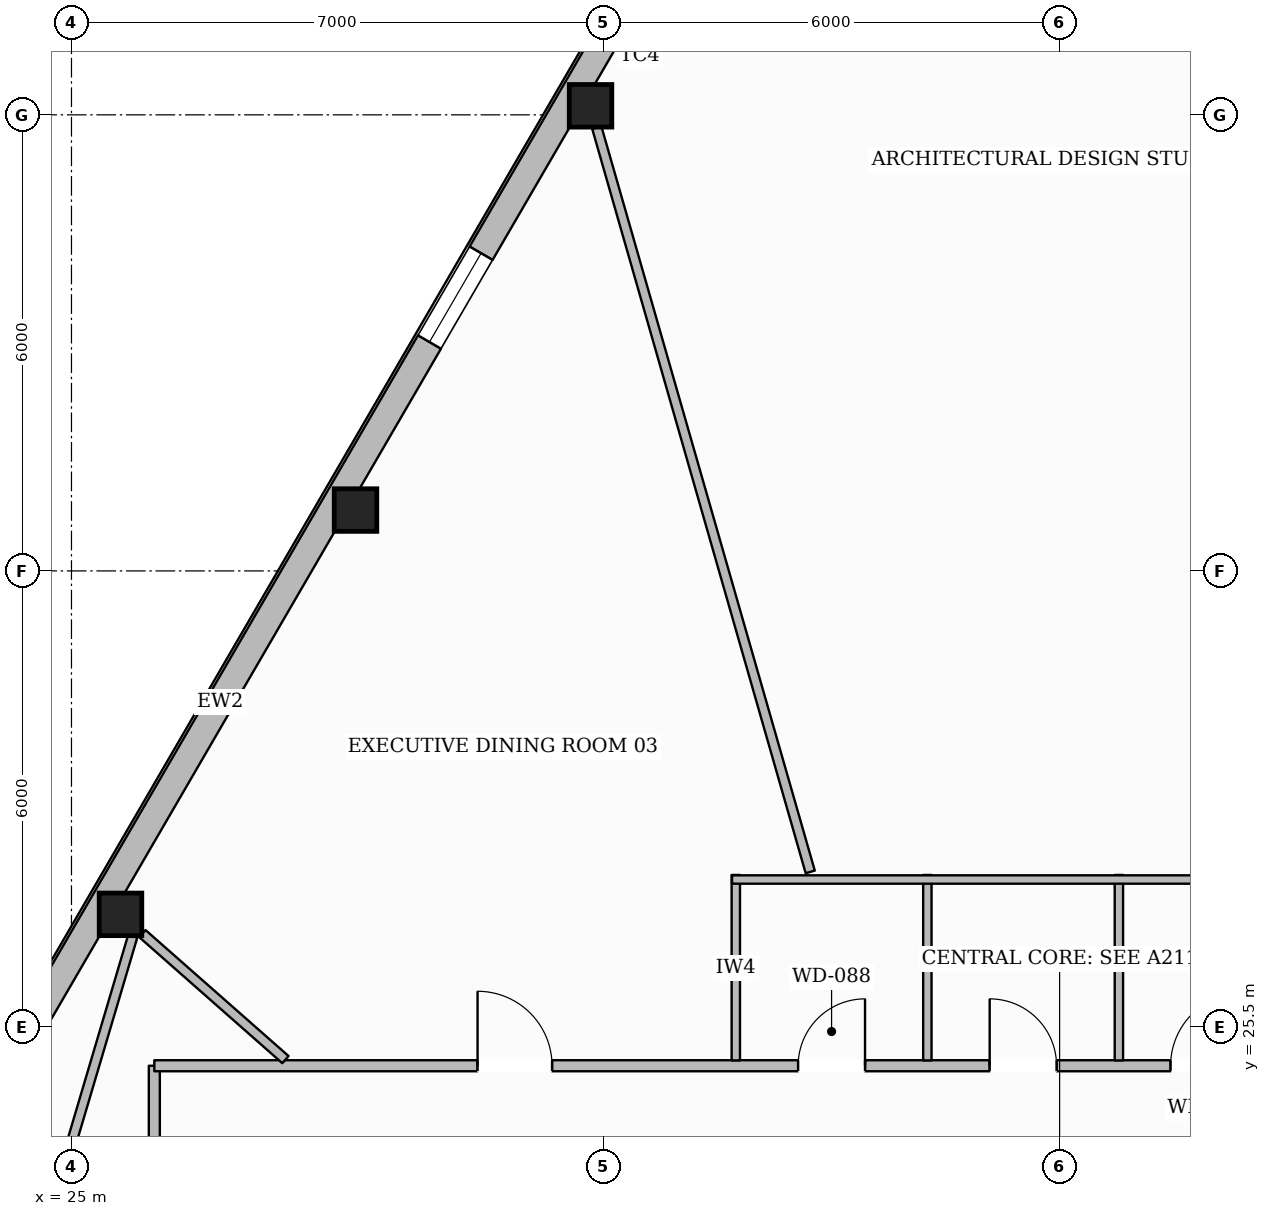
"""IFC4 building model, lengths in metres.
Left out: names, types, materials, properties, quantities, classifications, styles, units other than length and angle.
Written with IfcOpenShell. Run it as: python <this file> out.ifc"""

import sys

from ifc_helpers import new_model, si_unit, direction, frame, frame_2d, origin, origin_2d, place, context, subcontext, project, spatial, rectangle, hollow_rectangle, extrude, element, fill, save


model = new_model("IFC4")
c1 = context("Model", 3, precision=1e-05, world=origin(), true_north=direction((0.0, 1.0)))
c2 = subcontext(c1, "Body", "Model", "MODEL_VIEW")
j1 = project(units=[si_unit("LENGTHUNIT", "METRE"), si_unit("PLANEANGLEUNIT", "RADIAN")], contexts=[c1])
p1 = place(None, origin())
s1 = spatial("IfcSite", under=j1, at=p1, CompositionType="ELEMENT")
p2 = place(p1, origin())
s2 = spatial("IfcBuilding", under=s1, at=p2, CompositionType="ELEMENT")
p3 = place(p2, frame((0.0, 0.0, 266.45)))
s3 = spatial("IfcBuildingStorey", under=s2, at=p3, CompositionType="ELEMENT", Elevation=266.45)
for number, where, z_axis, x_axis in (
    (1, (31.829, 37.619, 0.0), (0.0, 0.0, 1.0), (1.0, 0.0, 0.0)),
    (2, (28.737, 32.3, 0.0), (0.0, 0.0, 1.0), (1.0, 0.0, 0.0)),
    (3, (25.645, 26.982, 0.0), (0.0, 0.0, 1.0), (1.0, 0.0, 0.0)),
):
    element("IfcColumn", number, at=place(p3, frame(where, z_axis=z_axis, x_axis=x_axis)), inside=s3, PredefinedType="COLUMN", context=c2, shape_type="SweptSolid", body=[
        extrude(hollow_rectangle(XDim=0.56, YDim=0.56, WallThickness=0.025, at=origin_2d()), origin(), (0.0, 0.0, 1.0), 3.61),
    ])
p4 = place(p3, frame((15.894, 10.745, 0.0), z_axis=(0.0, 0.0, 1.0), x_axis=(0.502581466224, 0.864529854781, 0.0)))
e4 = element("IfcWall", 4, at=p4, inside=s3, PredefinedType="STANDARD", context=c2, shape_type="SweptSolid", body=[
    extrude(rectangle(XDim=37.873, YDim=0.35, at=frame_2d((18.937, 0.0))), origin(), (0.0, 0.0, 1.0), 3.196),
])
p5 = place(p4, frame((33.643, 0.0, 0.65)))
e5 = element("IfcOpeningElement", 5, at=p5, cuts=e4, PredefinedType="OPENING", context=c2, shape_type="SweptSolid", body=[
    extrude(rectangle(XDim=1.35, YDim=1.75, at=frame_2d((0.675, 0.875))), frame((0.0, 0.185, 0.0), z_axis=(0.0, -1.0, 0.0), x_axis=(1.0, 0.0, 0.0)), (0.0, 0.0, 1.0), 0.37),
])
p6 = place(p4, frame((27.491, 0.0, 0.65)))
e6 = element("IfcOpeningElement", 6, at=p6, cuts=e4, PredefinedType="OPENING", context=c2, shape_type="SweptSolid", body=[
    extrude(rectangle(XDim=1.35, YDim=1.75, at=frame_2d((0.675, 0.875))), frame((0.0, 0.185, 0.0), z_axis=(0.0, -1.0, 0.0), x_axis=(1.0, 0.0, 0.0)), (0.0, 0.0, 1.0), 0.37),
])
p7 = place(p4, frame((15.187, 0.0, 0.65)))
e7 = element("IfcOpeningElement", 7, at=p7, cuts=e4, PredefinedType="OPENING", context=c2, shape_type="SweptSolid", body=[
    extrude(rectangle(XDim=1.35, YDim=1.75, at=frame_2d((0.675, 0.875))), frame((0.0, 0.185, 0.0), z_axis=(0.0, -1.0, 0.0), x_axis=(1.0, 0.0, 0.0)), (0.0, 0.0, 1.0), 0.37),
])
p8 = place(p4, frame((9.035, 0.0, 0.65)))
e8 = element("IfcOpeningElement", 8, at=p8, cuts=e4, PredefinedType="OPENING", context=c2, shape_type="SweptSolid", body=[
    extrude(rectangle(XDim=1.35, YDim=1.75, at=frame_2d((0.675, 0.875))), frame((0.0, 0.185, 0.0), z_axis=(0.0, -1.0, 0.0), x_axis=(1.0, 0.0, 0.0)), (0.0, 0.0, 1.0), 0.37),
])
p9 = place(p4, frame((2.883, 0.0, 0.65)))
e9 = element("IfcOpeningElement", 9, at=p9, cuts=e4, PredefinedType="OPENING", context=c2, shape_type="SweptSolid", body=[
    extrude(rectangle(XDim=1.35, YDim=1.75, at=frame_2d((0.675, 0.875))), frame((0.0, 0.185, 0.0), z_axis=(0.0, -1.0, 0.0), x_axis=(1.0, 0.0, 0.0)), (0.0, 0.0, 1.0), 0.37),
])
p10 = place(p3, frame((26.09, 7.21, 0.0), z_axis=(0.0, 0.0, 1.0), x_axis=(0.0, 1.0, 0.0)))
e10 = element("IfcWall", 10, at=p10, inside=s3, PredefinedType="PARTITIONING", context=c2, shape_type="SweptSolid", body=[
    extrude(rectangle(XDim=17.78, YDim=0.145, at=frame_2d((8.89, 0.0))), origin(), (0.0, 0.0, 1.0), 3.349),
])
p11 = place(p10, frame((12.838, 0.0, 0.0)))
e11 = element("IfcOpeningElement", 11, at=p11, cuts=e10, PredefinedType="OPENING", context=c2, shape_type="SweptSolid", body=[
    extrude(rectangle(XDim=0.98, YDim=2.15, at=frame_2d((0.49, 1.075))), frame((0.0, 0.083, 0.0), z_axis=(0.0, -1.0, 0.0), x_axis=(1.0, 0.0, 0.0)), (0.0, 0.0, 1.0), 0.165),
])
p12 = place(p10, frame((3.91, 0.0, 0.0)))
e12 = element("IfcOpeningElement", 12, at=p12, cuts=e10, PredefinedType="OPENING", context=c2, shape_type="SweptSolid", body=[
    extrude(rectangle(XDim=1.4, YDim=2.2, at=frame_2d((0.7, 1.1))), frame((0.0, 0.083, 0.0), z_axis=(0.0, -1.0, 0.0), x_axis=(1.0, 0.0, 0.0)), (0.0, 0.0, 1.0), 0.165),
])
p13 = place(p3, frame((26.09, 24.99, 0.0), z_axis=(0.0, 0.0, 1.0), x_axis=(1.0, 0.0, 0.0)))
e13 = element("IfcWall", 13, at=p13, inside=s3, PredefinedType="PARTITIONING", context=c2, shape_type="SweptSolid", body=[
    extrude(rectangle(XDim=17.11, YDim=0.145, at=frame_2d((8.555, 0.0))), origin(), (0.0, 0.0, 1.0), 3.61),
])
p14 = place(p13, frame((8.47, 0.0, 0.0)))
e14 = element("IfcOpeningElement", 14, at=p14, cuts=e13, PredefinedType="OPENING", context=c2, shape_type="SweptSolid", body=[
    extrude(rectangle(XDim=0.88, YDim=2.1, at=frame_2d((0.44, 1.05))), frame((0.0, 0.083, 0.0), z_axis=(0.0, -1.0, 0.0), x_axis=(1.0, 0.0, 0.0)), (0.0, 0.0, 1.0), 0.165),
])
p15 = place(p13, frame((10.99, 0.0, 0.0)))
e15 = element("IfcOpeningElement", 15, at=p15, cuts=e13, PredefinedType="OPENING", context=c2, shape_type="SweptSolid", body=[
    extrude(rectangle(XDim=0.88, YDim=2.1, at=frame_2d((0.44, 1.05))), frame((0.0, 0.083, 0.0), z_axis=(0.0, -1.0, 0.0), x_axis=(1.0, 0.0, 0.0)), (0.0, 0.0, 1.0), 0.165),
])
p16 = place(p13, frame((13.37, 0.0, 0.0)))
e16 = element("IfcOpeningElement", 16, at=p16, cuts=e13, PredefinedType="OPENING", context=c2, shape_type="SweptSolid", body=[
    extrude(rectangle(XDim=0.96, YDim=2.1, at=frame_2d((0.48, 1.05))), frame((0.0, 0.083, 0.0), z_axis=(0.0, -1.0, 0.0), x_axis=(1.0, 0.0, 0.0)), (0.0, 0.0, 1.0), 0.165),
])
p17 = place(p13, frame((4.253, 0.0, 0.0)))
e17 = element("IfcOpeningElement", 17, at=p17, cuts=e13, PredefinedType="OPENING", context=c2, shape_type="SweptSolid", body=[
    extrude(rectangle(XDim=0.98, YDim=2.15, at=frame_2d((0.49, 1.075))), frame((0.0, 0.083, 0.0), z_axis=(0.0, -1.0, 0.0), x_axis=(1.0, 0.0, 0.0)), (0.0, 0.0, 1.0), 0.165),
])
for number, where, z_axis, x_axis in (
    (18, (33.74, 25.06, 0.0), (0.0, 0.0, 1.0), (0.0, 1.0, 0.0)),
    (19, (36.26, 25.06, 0.0), (0.0, 0.0, 1.0), (0.0, 1.0, 0.0)),
    (20, (38.78, 25.06, 0.0), (0.0, 0.0, 1.0), (0.0, 1.0, 0.0)),
):
    element("IfcWall", number, at=place(p3, frame(where, z_axis=z_axis, x_axis=x_axis)), inside=s3, PredefinedType="PLUMBINGWALL", context=c2, shape_type="SweptSolid", body=[
        extrude(rectangle(XDim=2.44, YDim=0.11, at=frame_2d((1.22, 0.0))), origin(), (0.0, 0.0, 1.0), 3.61),
    ])
p18 = place(p3, frame((33.69, 27.44, 0.0), z_axis=(0.0, 0.0, 1.0), x_axis=(1.0, 0.0, 0.0)))
e21 = element("IfcWall", 21, at=p18, inside=s3, PredefinedType="PLUMBINGWALL", context=c2, shape_type="SweptSolid", body=[
    extrude(rectangle(XDim=7.46, YDim=0.11, at=frame_2d((3.73, 0.0))), origin(), (0.0, 0.0, 1.0), 3.61),
])
p19 = place(p3, frame((34.719, 27.54, 0.0), z_axis=(0.0, 0.0, 1.0), x_axis=(-0.275667544418, 0.961253038983, 0.0)))
e22 = element("IfcWall", 22, at=p19, inside=s3, PredefinedType="PARTITIONING", context=c2, shape_type="SweptSolid", body=[
    extrude(rectangle(XDim=10.186, YDim=0.125, at=frame_2d((5.093, 0.0))), origin(), (0.0, 0.0, 1.0), 3.61),
])
p20 = place(p3, frame((27.815, 25.071, 0.0), z_axis=(0.0, 0.0, 1.0), x_axis=(-0.750425677114, 0.660954841973, 0.0)))
e23 = element("IfcWall", 23, at=p20, inside=s3, PredefinedType="PARTITIONING", context=c2, shape_type="SweptSolid", body=[
    extrude(rectangle(XDim=2.508, YDim=0.125, at=frame_2d((1.254, 0.0))), origin(), (0.0, 0.0, 1.0), 3.61),
])
p21 = place(p3, frame((25.806, 26.694, 0.0), z_axis=(0.0, 0.0, 1.0), x_axis=(-0.28412826647, -0.958786278684, 0.0)))
e24 = element("IfcWall", 24, at=p21, inside=s3, PredefinedType="PARTITIONING", context=c2, shape_type="SweptSolid", body=[
    extrude(rectangle(XDim=10.823, YDim=0.125, at=frame_2d((5.412, 0.0))), origin(), (0.0, 0.0, 1.0), 3.349),
])
p22 = place(p21, frame((4.814, 0.0, 0.0)))
e25 = element("IfcOpeningElement", 25, at=p22, cuts=e24, PredefinedType="OPENING", context=c2, shape_type="SweptSolid", body=[
    extrude(rectangle(XDim=0.98, YDim=2.15, at=frame_2d((0.49, 1.075))), frame((0.0, 0.073, 0.0), z_axis=(0.0, -1.0, 0.0), x_axis=(1.0, 0.0, 0.0)), (0.0, 0.0, 1.0), 0.145),
])
p23 = place(p6, origin())
e26 = element("IfcWindow", 26, at=p23, inside=s3, PartitioningType="SINGLE_PANEL", PredefinedType="WINDOW", context=c2, shape_type="SweptSolid", body=[
    extrude(rectangle(XDim=1.35, YDim=1.75, at=frame_2d((0.675, 0.875))), frame((0.0, 0.03, 0.0), z_axis=(0.0, -1.0, 0.0), x_axis=(1.0, 0.0, 0.0)), (0.0, 0.0, 1.0), 0.06),
])
fill(e6, e26)
p24 = place(p14, origin())
e27 = element("IfcDoor", 27, at=p24, inside=s3, OperationType="SINGLE_SWING_RIGHT", PredefinedType="DOOR", context=c2, shape_type="SweptSolid", body=[
    extrude(rectangle(XDim=0.88, YDim=2.1, at=frame_2d((0.44, 1.05))), frame((0.0, 0.025, 0.0), z_axis=(0.0, -1.0, 0.0), x_axis=(1.0, 0.0, 0.0)), (0.0, 0.0, 1.0), 0.05),
])
fill(e14, e27)
p25 = place(p15, origin())
e28 = element("IfcDoor", 28, at=p25, inside=s3, OperationType="SINGLE_SWING_LEFT", PredefinedType="DOOR", context=c2, shape_type="SweptSolid", body=[
    extrude(rectangle(XDim=0.88, YDim=2.1, at=frame_2d((0.44, 1.05))), frame((0.0, 0.025, 0.0), z_axis=(0.0, -1.0, 0.0), x_axis=(1.0, 0.0, 0.0)), (0.0, 0.0, 1.0), 0.05),
])
fill(e15, e28)
p26 = place(p16, origin())
e29 = element("IfcDoor", 29, at=p26, inside=s3, OperationType="SINGLE_SWING_RIGHT", PredefinedType="DOOR", context=c2, shape_type="SweptSolid", body=[
    extrude(rectangle(XDim=0.96, YDim=2.1, at=frame_2d((0.48, 1.05))), frame((0.0, 0.025, 0.0), z_axis=(0.0, -1.0, 0.0), x_axis=(1.0, 0.0, 0.0)), (0.0, 0.0, 1.0), 0.05),
])
fill(e16, e29)
p27 = place(p17, origin())
e30 = element("IfcDoor", 30, at=p27, inside=s3, OperationType="SINGLE_SWING_LEFT", PredefinedType="DOOR", context=c2, shape_type="SweptSolid", body=[
    extrude(rectangle(XDim=0.98, YDim=2.15, at=frame_2d((0.49, 1.075))), frame((0.0, 0.025, 0.0), z_axis=(0.0, -1.0, 0.0), x_axis=(1.0, 0.0, 0.0)), (0.0, 0.0, 1.0), 0.05),
])
fill(e17, e30)
save(model, sys.argv[1])
